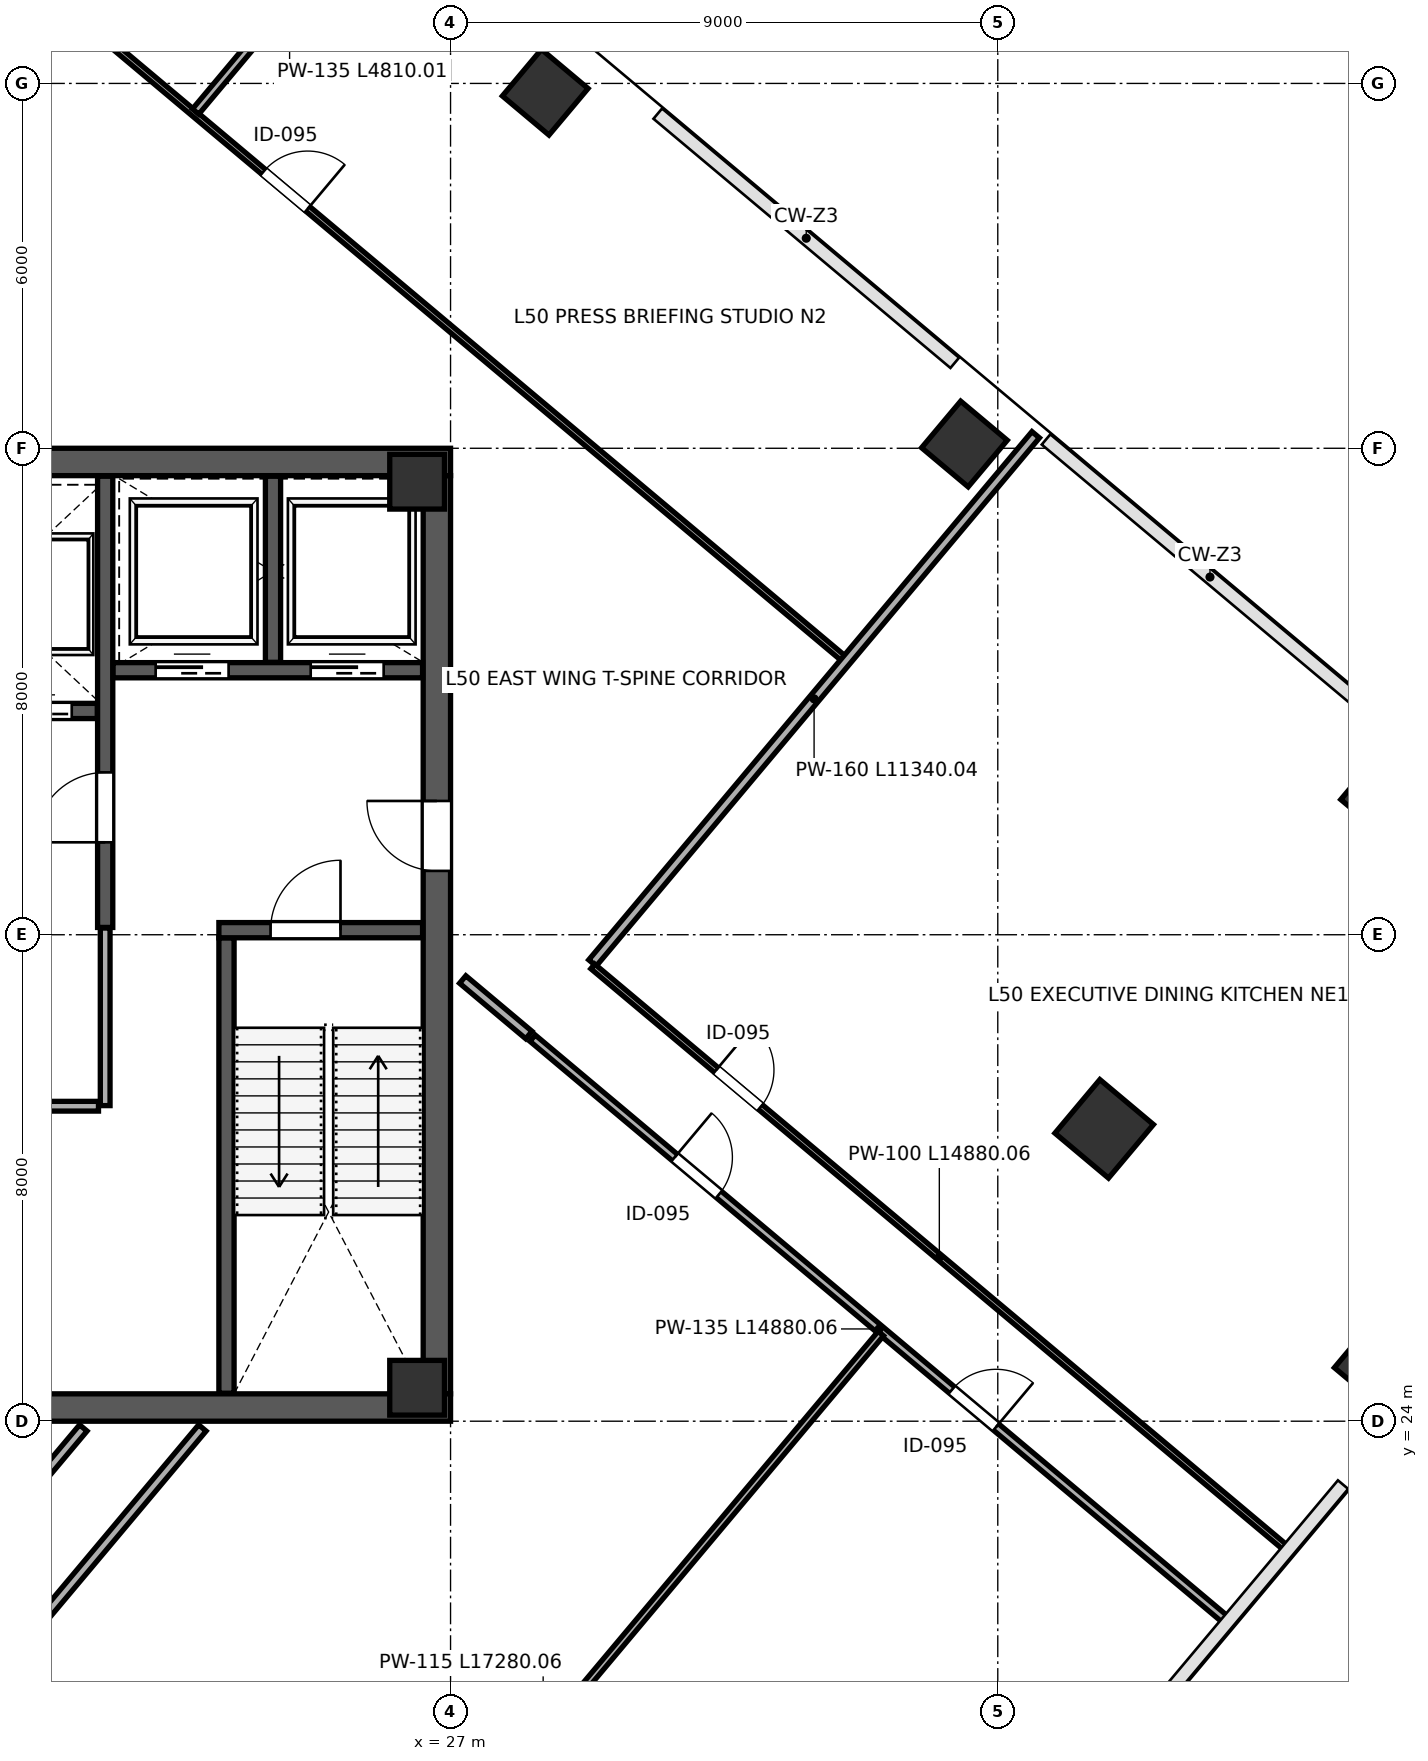
"""IFC4 building model, lengths in metres.
Left out: names, types, materials, properties, quantities, classifications, styles, units other than length and angle.
Written with IfcOpenShell. Run it as: python <this file> out.ifc"""

import sys

from ifc_helpers import new_model, si_unit, direction, frame, frame_2d, origin, origin_2d, place, context, subcontext, project, spatial, rectangle, extrude, clip, halfspace, source, transform, mapped, element, fill, save


model = new_model("IFC4")
c1 = context("Model", 3, precision=1e-05, world=origin(), true_north=direction((0.0, 1.0)))
c2 = subcontext(c1, "Body", "Model", "MODEL_VIEW")
j1 = project(units=[si_unit("LENGTHUNIT", "METRE"), si_unit("PLANEANGLEUNIT", "RADIAN")], contexts=[c1])
p1 = place(None, origin())
s1 = spatial("IfcSite", under=j1, at=p1, CompositionType="ELEMENT")
p2 = place(p1, origin())
s2 = spatial("IfcBuilding", under=s1, at=p2, CompositionType="ELEMENT")
p3 = place(p2, frame((0.0, 0.0, 224.8)))
s3 = spatial("IfcBuildingStorey", under=s2, at=p3, CompositionType="ELEMENT", Elevation=224.8)
m1 = source(origin(), c2, "Body", "SweptSolid", [
    extrude(rectangle(XDim=0.9, YDim=0.9, at=origin_2d()), origin(), (0.0, 0.0, 1.0), 4.198),
])
for number, where, z_axis, x_axis in (
    (1, (26.45, 24.55, 0.001), (0.0, 0.0, 1.0), (1.0, 0.0, 0.0)),
    (2, (26.45, 39.45, 0.001), (0.0, 0.0, 1.0), (1.0, 0.0, 0.0)),
):
    element("IfcColumn", number, at=place(p3, frame(where, z_axis=z_axis, x_axis=x_axis)), inside=s3, PredefinedType="COLUMN", context=c2, shape_type="MappedRepresentation", body=[
        mapped(m1, transform((0.0, 0.0, 0.0), scale=1.0)),
    ])
p4 = place(p3, frame((28.557, 45.855, 0.0), z_axis=(0.140479821095, -0.0754619954, 0.987203579367), x_axis=(-0.921521408534, -0.374555209537, 0.102502139601)))
e3 = element("IfcColumn", 3, at=p4, inside=s3, PredefinedType="COLUMN", context=c2, shape_type="Clipping", body=[
    clip(clip(extrude(rectangle(XDim=1.0, YDim=1.0, at=origin_2d()), origin(), (0.0, 0.0, 1.0), 4.254), halfspace(frame((0.0, 0.0, 0.115), z_axis=(0.0, 0.0, -1.0), x_axis=(1.0, 0.0, 0.0)), False)), halfspace(frame((0.0, 0.0, 4.14), z_axis=(0.0, 0.0, 1.0), x_axis=(1.0, 0.0, 0.0)), False)),
])
p5 = place(p3, frame((35.451, 40.07, 0.0), z_axis=(0.079575811303, -0.144704141015, 0.986269943691), x_axis=(-0.976727213265, 0.186375919699, 0.106150682633)))
e4 = element("IfcColumn", 4, at=p5, inside=s3, PredefinedType="COLUMN", context=c2, shape_type="Clipping", body=[
    clip(clip(extrude(rectangle(XDim=1.0, YDim=1.0, at=origin_2d()), origin(), (0.0, 0.0, 1.0), 4.258), halfspace(frame((0.0, 0.0, 0.119), z_axis=(0.0, 0.0, -1.0), x_axis=(1.0, 0.0, 0.0)), False)), halfspace(frame((0.0, 0.0, 4.14), z_axis=(0.0, 0.0, 1.0), x_axis=(1.0, 0.0, 0.0)), False)),
])
p6 = place(p3, frame((37.75, 28.808, 0.0), z_axis=(-0.03632076439, -0.165563105814, 0.985530141633), x_axis=(-0.612506303648, 0.782921032807, 0.108952670366)))
e5 = element("IfcColumn", 5, at=p6, inside=s3, PredefinedType="COLUMN", context=c2, shape_type="Clipping", body=[
    clip(clip(extrude(rectangle(XDim=1.15, YDim=1.15, at=origin_2d()), origin(), (0.0, 0.0, 1.0), 4.262), halfspace(frame((0.0, 0.0, 0.14), z_axis=(0.0, 0.0, -1.0), x_axis=(1.0, 0.0, 0.0)), False)), halfspace(frame((0.0, 0.0, 4.122), z_axis=(0.0, 0.0, 1.0), x_axis=(1.0, 0.0, 0.0)), False)),
])
p7 = place(p3, frame((42.346, 34.285, 0.0), z_axis=(0.018572788535, -0.2120251364, 0.977087710014), x_axis=(-0.817928581317, 0.558816722632, 0.136809014223)))
e6 = element("IfcColumn", 6, at=p7, inside=s3, PredefinedType="COLUMN", context=c2, shape_type="Clipping", body=[
    clip(clip(extrude(rectangle(XDim=1.0, YDim=1.0, at=origin_2d()), origin(), (0.0, 0.0, 1.0), 4.298), halfspace(frame((0.0, 0.0, 0.154), z_axis=(0.0, 0.0, -1.0), x_axis=(1.0, 0.0, 0.0)), False)), halfspace(frame((0.0, 0.0, 4.144), z_axis=(0.0, 0.0, 1.0), x_axis=(1.0, 0.0, 0.0)), False)),
])
p8 = place(p3, frame((42.346, 24.951, 0.0), z_axis=(-0.075991145191, -0.20949982384, 0.974851357728), x_axis=(-0.506463303219, 0.850279137087, 0.143249124001)))
e7 = element("IfcColumn", 7, at=p8, inside=s3, PredefinedType="COLUMN", context=c2, shape_type="Clipping", body=[
    clip(clip(extrude(rectangle(XDim=1.15, YDim=1.15, at=origin_2d()), origin(), (0.0, 0.0, 1.0), 4.308), halfspace(frame((0.0, 0.0, 0.186), z_axis=(0.0, 0.0, -1.0), x_axis=(1.0, 0.0, 0.0)), False)), halfspace(frame((0.0, 0.0, 4.122), z_axis=(0.0, 0.0, 1.0), x_axis=(1.0, 0.0, 0.0)), False)),
])
p9 = place(p3, frame((26.775, 24.45, 0.0), z_axis=(0.0, 0.0, 1.0), x_axis=(0.0, 1.0, 0.0)))
e8 = element("IfcWall", 8, at=p9, inside=s3, PredefinedType="SHEAR", context=c2, shape_type="SweptSolid", body=[
    extrude(rectangle(XDim=15.1, YDim=0.45, at=frame_2d((7.55, 0.0))), origin(), (0.0, 0.0, 1.0), 3.96),
])
p10 = place(p9, frame((8.6, 0.0, 0.0)))
e9 = element("IfcOpeningElement", 9, at=p10, cuts=e8, PredefinedType="OPENING", context=c2, shape_type="SweptSolid", body=[
    extrude(rectangle(XDim=1.15, YDim=2.2, at=frame_2d((0.575, 1.1))), frame((0.0, 0.235, 0.0), z_axis=(0.0, -1.0, 0.0), x_axis=(1.0, 0.0, 0.0)), (0.0, 0.0, 1.0), 0.47),
])
for number, where, z_axis, x_axis in (
    (10, (9.0, 24.225, 0.0), (0.0, 0.0, 1.0), (1.0, 0.0, 0.0)),
    (11, (9.0, 39.775, 0.0), (0.0, 0.0, 1.0), (1.0, 0.0, 0.0)),
):
    element("IfcWall", number, at=place(p3, frame(where, z_axis=z_axis, x_axis=x_axis)), inside=s3, PredefinedType="SHEAR", context=c2, shape_type="SweptSolid", body=[
        extrude(rectangle(XDim=18.0, YDim=0.45, at=frame_2d((9.0, 0.0))), origin(), (0.0, 0.0, 1.0), 3.96),
    ])
p11 = place(p3, frame((23.315, 24.46, 0.0), z_axis=(0.0, 0.0, 1.0), x_axis=(0.0, 1.0, 0.0)))
e12 = element("IfcWall", 12, at=p11, inside=s3, PredefinedType="SHEAR", context=c2, shape_type="SweptSolid", body=[
    extrude(rectangle(XDim=7.49, YDim=0.25, at=frame_2d((3.745, 0.0))), origin(), (0.0, 0.0, 1.0), 3.96),
])
p12 = place(p3, frame((23.19, 32.075, 0.0), z_axis=(0.0, 0.0, 1.0), x_axis=(1.0, 0.0, 0.0)))
e13 = element("IfcWall", 13, at=p12, inside=s3, PredefinedType="SHEAR", context=c2, shape_type="SweptSolid", body=[
    extrude(rectangle(XDim=3.35, YDim=0.25, at=frame_2d((1.675, 0.0))), origin(), (0.0, 0.0, 1.0), 3.96),
])
p13 = place(p12, frame((0.85, 0.0, 0.0)))
e14 = element("IfcOpeningElement", 14, at=p13, cuts=e13, PredefinedType="OPENING", context=c2, shape_type="SweptSolid", body=[
    extrude(rectangle(XDim=1.15, YDim=2.2, at=frame_2d((0.575, 1.1))), frame((0.0, 0.135, 0.0), z_axis=(0.0, -1.0, 0.0), x_axis=(1.0, 0.0, 0.0)), (0.0, 0.0, 1.0), 0.27),
])
p14 = place(p3, frame((21.32, 32.12, 0.0), z_axis=(0.0, 0.0, 1.0), x_axis=(0.0, 1.0, 0.0)))
e15 = element("IfcWall", 15, at=p14, inside=s3, PredefinedType="SHEAR", context=c2, shape_type="SweptSolid", body=[
    extrude(rectangle(XDim=7.42, YDim=0.25, at=frame_2d((3.71, 0.0))), origin(), (0.0, 0.0, 1.0), 3.96),
])
p15 = place(p14, frame((1.4, 0.0, 0.0)))
e16 = element("IfcOpeningElement", 16, at=p15, cuts=e15, PredefinedType="OPENING", context=c2, shape_type="SweptSolid", body=[
    extrude(rectangle(XDim=1.15, YDim=2.2, at=frame_2d((0.575, 1.1))), frame((0.0, 0.135, 0.0), z_axis=(0.0, -1.0, 0.0), x_axis=(1.0, 0.0, 0.0)), (0.0, 0.0, 1.0), 0.27),
])
p16 = place(p3, frame((21.45, 36.35, 0.0), z_axis=(0.0, 0.0, 1.0), x_axis=(1.0, 0.0, 0.0)))
e17 = element("IfcWall", 17, at=p16, inside=s3, PredefinedType="SHEAR", context=c2, shape_type="SweptSolid", body=[
    extrude(rectangle(XDim=5.09, YDim=0.25, at=frame_2d((2.545, 0.0))), origin(), (0.0, 0.0, 1.0), 3.96),
])
p17 = place(p16, frame((0.7, 0.0, 0.0)))
e18 = element("IfcOpeningElement", 18, at=p17, cuts=e17, PredefinedType="OPENING", context=c2, shape_type="SweptSolid", body=[
    extrude(rectangle(XDim=1.2, YDim=2.2, at=frame_2d((0.6, 1.1))), frame((0.0, 0.135, 0.0), z_axis=(0.0, -1.0, 0.0), x_axis=(1.0, 0.0, 0.0)), (0.0, 0.0, 1.0), 0.27),
])
p18 = place(p16, frame((3.25, 0.0, 0.0)))
e19 = element("IfcOpeningElement", 19, at=p18, cuts=e17, PredefinedType="OPENING", context=c2, shape_type="SweptSolid", body=[
    extrude(rectangle(XDim=1.2, YDim=2.2, at=frame_2d((0.6, 1.1))), frame((0.0, 0.135, 0.0), z_axis=(0.0, -1.0, 0.0), x_axis=(1.0, 0.0, 0.0)), (0.0, 0.0, 1.0), 0.27),
])
p19 = place(p3, frame((24.08, 36.48, 0.0), z_axis=(0.0, 0.0, 1.0), x_axis=(0.0, 1.0, 0.0)))
e20 = element("IfcWall", 20, at=p19, inside=s3, PredefinedType="SHEAR", context=c2, shape_type="SweptSolid", body=[
    extrude(rectangle(XDim=3.06, YDim=0.25, at=frame_2d((1.53, 0.0))), origin(), (0.0, 0.0, 1.0), 3.96),
])
p20 = place(p3, frame((17.32, 35.68, 0.0), z_axis=(0.0, 0.0, 1.0), x_axis=(1.0, 0.0, 0.0)))
e21 = element("IfcWall", 21, at=p20, inside=s3, PredefinedType="SHEAR", context=c2, shape_type="SweptSolid", body=[
    extrude(rectangle(XDim=3.87, YDim=0.25, at=frame_2d((1.935, 0.0))), origin(), (0.0, 0.0, 1.0), 3.96),
])
p21 = place(p20, frame((0.45, 0.0, 0.0)))
e22 = element("IfcOpeningElement", 22, at=p21, cuts=e21, PredefinedType="OPENING", context=c2, shape_type="SweptSolid", body=[
    extrude(rectangle(XDim=1.1, YDim=2.2, at=frame_2d((0.55, 1.1))), frame((0.0, 0.135, 0.0), z_axis=(0.0, -1.0, 0.0), x_axis=(1.0, 0.0, 0.0)), (0.0, 0.0, 1.0), 0.27),
])
p22 = place(p20, frame((2.35, 0.0, 0.0)))
e23 = element("IfcOpeningElement", 23, at=p22, cuts=e21, PredefinedType="OPENING", context=c2, shape_type="SweptSolid", body=[
    extrude(rectangle(XDim=1.1, YDim=2.2, at=frame_2d((0.55, 1.1))), frame((0.0, 0.135, 0.0), z_axis=(0.0, -1.0, 0.0), x_axis=(1.0, 0.0, 0.0)), (0.0, 0.0, 1.0), 0.27),
])
p23 = place(p3, frame((12.84, 29.18, 0.0), z_axis=(0.0, 0.0, 1.0), x_axis=(1.0, 0.0, 0.0)))
e24 = element("IfcWall", 24, at=p23, inside=s3, PredefinedType="PARTITIONING", context=c2, shape_type="SweptSolid", body=[
    extrude(rectangle(XDim=8.37, YDim=0.16, at=frame_2d((4.185, 0.0))), origin(), (0.0, 0.0, 1.0), 3.96),
])
p24 = place(p23, frame((0.95, 0.0, 0.0)))
e25 = element("IfcOpeningElement", 25, at=p24, cuts=e24, PredefinedType="OPENING", context=c2, shape_type="SweptSolid", body=[
    extrude(rectangle(XDim=0.85, YDim=2.1, at=frame_2d((0.425, 1.05))), frame((0.0, 0.09, 0.0), z_axis=(0.0, -1.0, 0.0), x_axis=(1.0, 0.0, 0.0)), (0.0, 0.0, 1.0), 0.18),
])
p25 = place(p23, frame((4.2, 0.0, 0.0)))
e26 = element("IfcOpeningElement", 26, at=p25, cuts=e24, PredefinedType="OPENING", context=c2, shape_type="SweptSolid", body=[
    extrude(rectangle(XDim=0.85, YDim=2.1, at=frame_2d((0.425, 1.05))), frame((0.0, 0.09, 0.0), z_axis=(0.0, -1.0, 0.0), x_axis=(1.0, 0.0, 0.0)), (0.0, 0.0, 1.0), 0.18),
])
p26 = place(p3, frame((21.32, 29.19, 0.0), z_axis=(0.0, 0.0, 1.0), x_axis=(0.0, 1.0, 0.0)))
e27 = element("IfcWall", 27, at=p26, inside=s3, PredefinedType="PARTITIONING", context=c2, shape_type="SweptSolid", body=[
    extrude(rectangle(XDim=2.92, YDim=0.16, at=frame_2d((1.46, 0.0))), origin(), (0.0, 0.0, 1.0), 3.96),
])
p27 = place(p3, frame((15.902, 17.861, 0.0), z_axis=(0.0, 0.0, 1.0), x_axis=(0.642774387864, 0.766055537351, 0.0)))
e28 = element("IfcWall", 28, at=p27, inside=s3, PredefinedType="PARTITIONING", context=c2, shape_type="SweptSolid", body=[
    extrude(rectangle(XDim=7.87, YDim=0.16, at=frame_2d((3.935, 0.0))), origin(), (0.0, 0.0, 1.0), 3.96),
])
p28 = place(p3, frame((27.2, 31.264, 0.0), z_axis=(0.0, 0.0, 1.0), x_axis=(0.766046809659, -0.642784789344, 0.0)))
e29 = element("IfcWall", 29, at=p28, inside=s3, PredefinedType="PARTITIONING", context=c2, shape_type="SweptSolid", body=[
    extrude(rectangle(XDim=1.42, YDim=0.16, at=frame_2d((0.71, 0.0))), origin(), (0.0, 0.0, 1.0), 3.96),
])
p29 = place(p3, frame((16.416, 50.848, 0.0), z_axis=(0.0, 0.0, 1.0), x_axis=(0.766043174175, -0.642789121951, 0.0)))
e30 = element("IfcWall", 30, at=p29, inside=s3, PredefinedType="PARTITIONING", context=c2, shape_type="SweptSolid", body=[
    extrude(rectangle(XDim=22.27, YDim=0.1, at=frame_2d((11.135, 0.0))), origin(), (0.0, 0.0, 1.0), 3.96),
])
p30 = place(p29, frame((1.05, 0.0, 0.0)))
e31 = element("IfcOpeningElement", 31, at=p30, cuts=e30, PredefinedType="OPENING", context=c2, shape_type="SweptSolid", body=[
    extrude(rectangle(XDim=0.95, YDim=2.15, at=frame_2d((0.475, 1.075))), frame((0.0, 0.06, 0.0), z_axis=(0.0, -1.0, 0.0), x_axis=(1.0, 0.0, 0.0)), (0.0, 0.0, 1.0), 0.12),
])
p31 = place(p29, frame((9.8, 0.0, 0.0)))
e32 = element("IfcOpeningElement", 32, at=p31, cuts=e30, PredefinedType="OPENING", context=c2, shape_type="SweptSolid", body=[
    extrude(rectangle(XDim=0.95, YDim=2.15, at=frame_2d((0.475, 1.075))), frame((0.0, 0.06, 0.0), z_axis=(0.0, -1.0, 0.0), x_axis=(1.0, 0.0, 0.0)), (0.0, 0.0, 1.0), 0.12),
])
p32 = place(p3, frame((22.807, 45.537, 0.0), z_axis=(0.0, 0.0, 1.0), x_axis=(0.642796794607, 0.766036735961, 0.0)))
e33 = element("IfcWall", 33, at=p32, inside=s3, PredefinedType="PARTITIONING", context=c2, shape_type="SweptSolid", body=[
    extrude(rectangle(XDim=4.81, YDim=0.135, at=frame_2d((2.405, 0.0))), origin(), (0.0, 0.0, 1.0), 3.195),
])
p33 = place(p3, frame((29.334, 31.535, 0.0), z_axis=(0.0, 0.0, 1.0), x_axis=(0.642789592208, 0.766042779581, 0.0)))
e34 = element("IfcWall", 34, at=p33, inside=s3, PredefinedType="PARTITIONING", context=c2, shape_type="SweptSolid", body=[
    extrude(rectangle(XDim=11.34, YDim=0.16, at=frame_2d((5.67, 0.0))), origin(), (0.0, 0.0, 1.0), 3.195),
])
p34 = place(p3, frame((14.743, 14.146, 0.0), z_axis=(0.0, 0.0, 1.0), x_axis=(0.642789996784, 0.7660424401, 0.0)))
e35 = element("IfcWall", 35, at=p34, inside=s3, PredefinedType="PARTITIONING", context=c2, shape_type="SweptSolid", body=[
    extrude(rectangle(XDim=12.719, YDim=0.16, at=frame_2d((6.359, 0.0))), origin(), (0.0, 0.0, 1.0), 3.96),
])
p35 = place(p3, frame((29.339, 31.479, 0.0), z_axis=(0.0, 0.0, 1.0), x_axis=(0.766048981681, -0.6427822008, 0.0)))
e36 = element("IfcWall", 36, at=p35, inside=s3, PredefinedType="PARTITIONING", context=c2, shape_type="SweptSolid", body=[
    extrude(rectangle(XDim=14.88, YDim=0.1, at=frame_2d((7.44, 0.0))), origin(), (0.0, 0.0, 1.0), 3.96),
])
p36 = place(p35, frame((2.65, 0.0, 0.0)))
e37 = element("IfcOpeningElement", 37, at=p36, cuts=e36, PredefinedType="OPENING", context=c2, shape_type="SweptSolid", body=[
    extrude(rectangle(XDim=0.95, YDim=2.15, at=frame_2d((0.475, 1.075))), frame((0.0, 0.06, 0.0), z_axis=(0.0, -1.0, 0.0), x_axis=(1.0, 0.0, 0.0)), (0.0, 0.0, 1.0), 0.12),
])
p37 = place(p3, frame((28.349, 30.3, 0.0), z_axis=(0.0, 0.0, 1.0), x_axis=(0.766042202636, -0.642790279781, 0.0)))
e38 = element("IfcWall", 38, at=p37, inside=s3, PredefinedType="PARTITIONING", context=c2, shape_type="SweptSolid", body=[
    extrude(rectangle(XDim=14.88, YDim=0.135, at=frame_2d((7.44, 0.0))), origin(), (0.0, 0.0, 1.0), 3.96),
])
p38 = place(p37, frame((3.05, 0.0, 0.0)))
e39 = element("IfcOpeningElement", 39, at=p38, cuts=e38, PredefinedType="OPENING", context=c2, shape_type="SweptSolid", body=[
    extrude(rectangle(XDim=0.95, YDim=2.15, at=frame_2d((0.475, 1.075))), frame((0.0, 0.078, 0.0), z_axis=(0.0, -1.0, 0.0), x_axis=(1.0, 0.0, 0.0)), (0.0, 0.0, 1.0), 0.155),
])
p39 = place(p37, frame((9.0, 0.0, 0.0)))
e40 = element("IfcOpeningElement", 40, at=p39, cuts=e38, PredefinedType="OPENING", context=c2, shape_type="SweptSolid", body=[
    extrude(rectangle(XDim=0.95, YDim=2.15, at=frame_2d((0.475, 1.075))), frame((0.0, 0.078, 0.0), z_axis=(0.0, -1.0, 0.0), x_axis=(1.0, 0.0, 0.0)), (0.0, 0.0, 1.0), 0.155),
])
p40 = place(p3, frame((22.969, 12.204, 0.0), z_axis=(0.0, 0.0, 1.0), x_axis=(0.642787758903, 0.766044317912, 0.0)))
e41 = element("IfcWall", 41, at=p40, inside=s3, PredefinedType="PARTITIONING", context=c2, shape_type="SweptSolid", body=[
    extrude(rectangle(XDim=17.28, YDim=0.115, at=frame_2d((8.64, 0.0))), origin(), (0.0, 0.0, 1.0), 3.96),
])
m2 = source(origin(), c2, "Body", "SweptSolid", [
    extrude(rectangle(XDim=1.15, YDim=2.2, at=frame_2d((0.575, 1.1))), frame((0.0, 0.025, 0.0), z_axis=(0.0, -1.0, 0.0), x_axis=(1.0, 0.0, 0.0)), (0.0, 0.0, 1.0), 0.05),
])
p41 = place(p15, origin())
e42 = element("IfcDoor", 42, at=p41, inside=s3, OperationType="SINGLE_SWING_LEFT", PredefinedType="DOOR", context=c2, shape_type="MappedRepresentation", body=[
    mapped(m2, transform((0.0, 0.0, 0.0), scale=1.0)),
])
fill(e16, e42)
m3 = source(origin(), c2, "Body", "SweptSolid", [
    extrude(rectangle(XDim=1.15, YDim=2.2, at=frame_2d((0.575, 1.1))), frame((0.0, 0.025, 0.0), z_axis=(0.0, -1.0, 0.0), x_axis=(1.0, 0.0, 0.0)), (0.0, 0.0, 1.0), 0.05),
])
p42 = place(p13, origin())
e43 = element("IfcDoor", 43, at=p42, inside=s3, OperationType="SINGLE_SWING_RIGHT", PredefinedType="DOOR", context=c2, shape_type="MappedRepresentation", body=[
    mapped(m3, transform((0.0, 0.0, 0.0), scale=1.0)),
])
fill(e14, e43)
p43 = place(p10, origin())
e44 = element("IfcDoor", 44, at=p43, inside=s3, OperationType="SINGLE_SWING_RIGHT", PredefinedType="DOOR", context=c2, shape_type="MappedRepresentation", body=[
    mapped(m2, transform((0.0, 0.0, 0.0), scale=1.0)),
])
fill(e9, e44)
m4 = source(origin(), c2, "Body", "SweptSolid", [
    extrude(rectangle(XDim=1.1, YDim=2.2, at=frame_2d((0.55, 1.1))), frame((0.0, 0.025, 0.0), z_axis=(0.0, -1.0, 0.0), x_axis=(1.0, 0.0, 0.0)), (0.0, 0.0, 1.0), 0.05),
])
p44 = place(p22, origin())
e45 = element("IfcDoor", 45, at=p44, inside=s3, OperationType="SLIDING_TO_RIGHT", PredefinedType="DOOR", context=c2, shape_type="MappedRepresentation", body=[
    mapped(m4, transform((0.0, 0.0, 0.0), scale=1.0)),
])
fill(e23, e45)
m5 = source(origin(), c2, "Body", "SweptSolid", [
    extrude(rectangle(XDim=1.2, YDim=2.2, at=frame_2d((0.6, 1.1))), frame((0.0, 0.025, 0.0), z_axis=(0.0, -1.0, 0.0), x_axis=(1.0, 0.0, 0.0)), (0.0, 0.0, 1.0), 0.05),
])
p45 = place(p17, origin())
e46 = element("IfcDoor", 46, at=p45, inside=s3, OperationType="SLIDING_TO_LEFT", PredefinedType="DOOR", context=c2, shape_type="MappedRepresentation", body=[
    mapped(m5, transform((0.0, 0.0, 0.0), scale=1.0)),
])
fill(e18, e46)
p46 = place(p18, origin())
e47 = element("IfcDoor", 47, at=p46, inside=s3, OperationType="SLIDING_TO_RIGHT", PredefinedType="DOOR", context=c2, shape_type="MappedRepresentation", body=[
    mapped(m5, transform((0.0, 0.0, 0.0), scale=1.0)),
])
fill(e19, e47)
m6 = source(origin(), c2, "Body", "SweptSolid", [
    extrude(rectangle(XDim=0.95, YDim=2.15, at=frame_2d((0.475, 1.075))), frame((0.0, 0.025, 0.0), z_axis=(0.0, -1.0, 0.0), x_axis=(1.0, 0.0, 0.0)), (0.0, 0.0, 1.0), 0.05),
])
p47 = place(p31, origin())
e48 = element("IfcDoor", 48, at=p47, inside=s3, OperationType="SINGLE_SWING_RIGHT", PredefinedType="DOOR", context=c2, shape_type="MappedRepresentation", body=[
    mapped(m6, transform((0.0, 0.0, 0.0), scale=1.0)),
])
fill(e32, e48)
p48 = place(p36, origin())
e49 = element("IfcDoor", 49, at=p48, inside=s3, OperationType="SINGLE_SWING_LEFT", PredefinedType="DOOR", context=c2, shape_type="MappedRepresentation", body=[
    mapped(m6, transform((0.0, 0.0, 0.0), scale=1.0)),
])
fill(e37, e49)
p49 = place(p38, origin())
e50 = element("IfcDoor", 50, at=p49, inside=s3, OperationType="SINGLE_SWING_LEFT", PredefinedType="DOOR", context=c2, shape_type="MappedRepresentation", body=[
    mapped(m6, transform((0.0, 0.0, 0.0), scale=1.0)),
])
fill(e39, e50)
p50 = place(p39, origin())
e51 = element("IfcDoor", 51, at=p50, inside=s3, OperationType="SINGLE_SWING_RIGHT", PredefinedType="DOOR", context=c2, shape_type="MappedRepresentation", body=[
    mapped(m6, transform((0.0, 0.0, 0.0), scale=1.0)),
])
fill(e40, e51)
save(model, sys.argv[1])
